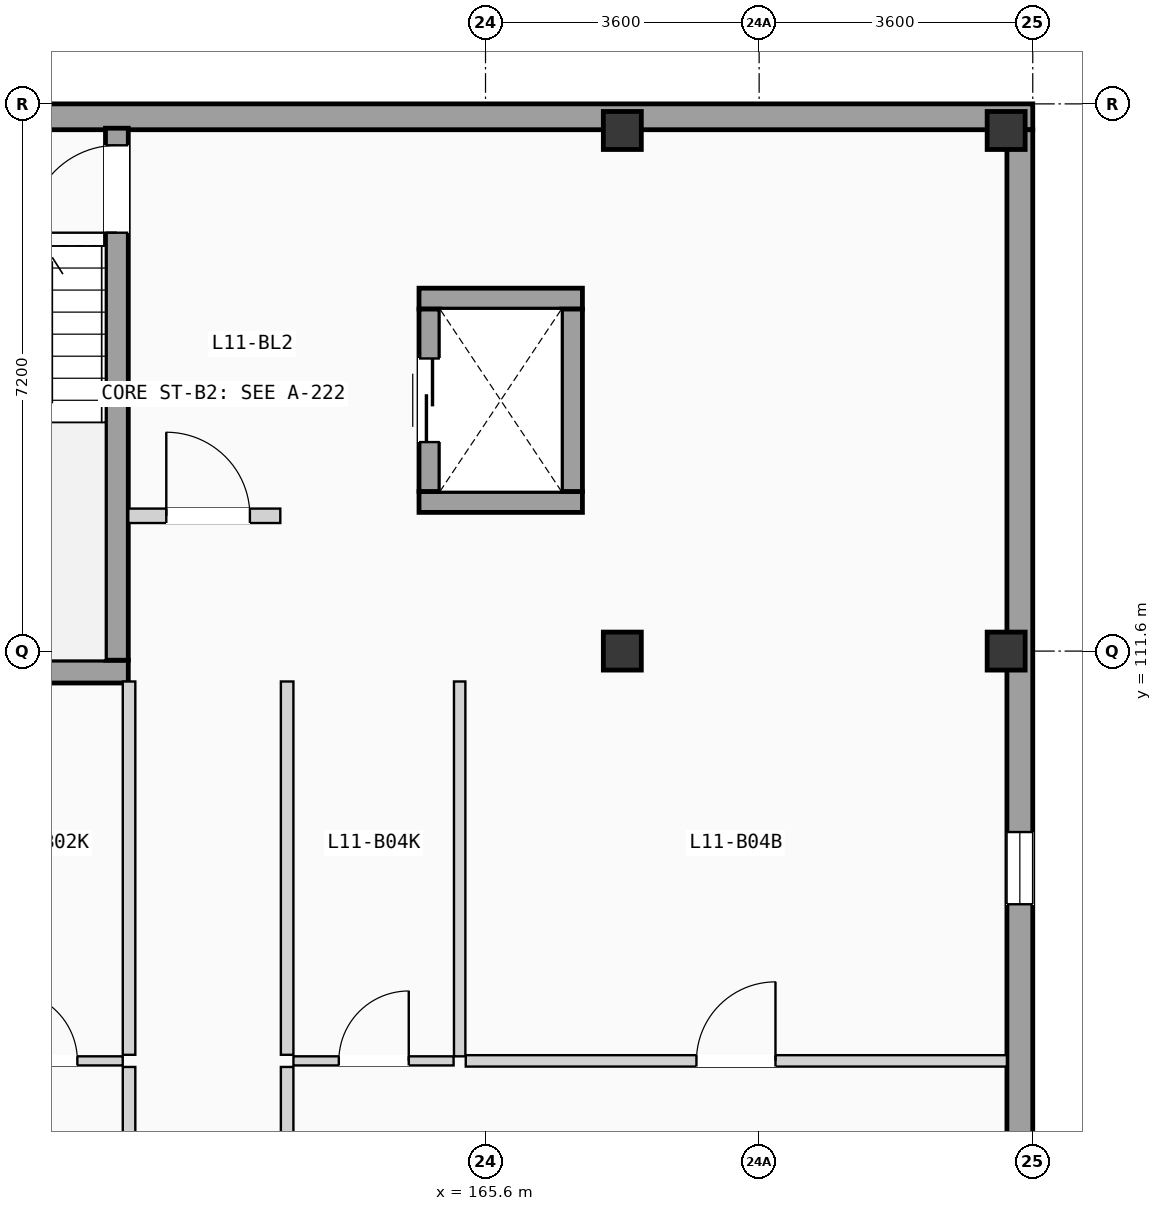
"""IFC4 building model, lengths in metres.
Left out: names, types, materials, properties, quantities, classifications, styles, units other than length and angle.
Written with IfcOpenShell. Run it as: python <this file> out.ifc"""

import sys

from ifc_helpers import new_model, si_unit, direction, frame, frame_2d, origin, origin_2d, place, context, subcontext, project, spatial, rectangle, extrude, element, fill, save


model = new_model("IFC4")
c1 = context("Model", 3, precision=1e-05, world=origin(), true_north=direction((0.0, 1.0)))
c2 = subcontext(c1, "Body", "Model", "MODEL_VIEW")
j1 = project(units=[si_unit("LENGTHUNIT", "METRE"), si_unit("PLANEANGLEUNIT", "RADIAN")], contexts=[c1])
p1 = place(None, origin())
s1 = spatial("IfcSite", under=j1, at=p1, CompositionType="ELEMENT")
p2 = place(p1, origin())
s2 = spatial("IfcBuilding", under=s1, at=p2, CompositionType="ELEMENT")
p3 = place(p2, frame((0.0, 0.0, 37.275)))
s3 = spatial("IfcBuildingStorey", under=s2, at=p3, CompositionType="ELEMENT", Elevation=37.275)
for number, where, z_axis, x_axis in (
    (1, (167.4, 111.6, 0.0), (0.0, 0.0, 1.0), (1.0, 0.0, 0.0)),
    (2, (167.4, 118.45, 0.0), (0.0, 0.0, 1.0), (1.0, 0.0, 0.0)),
    (3, (172.45, 111.6, 0.0), (0.0, 0.0, 1.0), (1.0, 0.0, 0.0)),
    (4, (172.45, 118.45, 0.0), (0.0, 0.0, 1.0), (1.0, 0.0, 0.0)),
):
    element("IfcColumn", number, at=place(p3, frame(where, z_axis=z_axis, x_axis=x_axis)), inside=s3, PredefinedType="COLUMN", context=c2, shape_type="SweptSolid", body=[
        extrude(rectangle(XDim=0.5, YDim=0.5, at=origin_2d()), origin(), (0.0, 0.0, 1.0), 3.15),
    ])
p4 = place(p3, frame((151.2, 118.63, 0.0), z_axis=(0.0, 0.0, 1.0), x_axis=(1.0, 0.0, 0.0)))
e5 = element("IfcWall", 5, at=p4, inside=s3, PredefinedType="SOLIDWALL", context=c2, shape_type="SweptSolid", body=[
    extrude(rectangle(XDim=21.6, YDim=0.34, at=frame_2d((10.8, 0.0))), origin(), (0.0, 0.0, 1.0), 2.6),
])
p5 = place(p3, frame((172.63, 68.74, 0.0), z_axis=(0.0, 0.0, 1.0), x_axis=(0.0, 1.0, 0.0)))
e6 = element("IfcWall", 6, at=p5, inside=s3, PredefinedType="SOLIDWALL", context=c2, shape_type="SweptSolid", body=[
    extrude(rectangle(XDim=49.72, YDim=0.34, at=frame_2d((24.86, 0.0))), origin(), (0.0, 0.0, 1.0), 2.6),
])
p6 = place(p5, frame((16.132, 0.0, 0.515)))
e7 = element("IfcOpeningElement", 7, at=p6, cuts=e6, PredefinedType="OPENING", context=c2, shape_type="SweptSolid", body=[
    extrude(rectangle(XDim=2.3, YDim=1.65, at=frame_2d((1.15, 0.825))), frame((0.0, 0.18, 0.0), z_axis=(0.0, -1.0, 0.0), x_axis=(1.0, 0.0, 0.0)), (0.0, 0.0, 1.0), 0.36),
])
p7 = place(p5, frame((9.678, 0.0, 0.85)))
e8 = element("IfcOpeningElement", 8, at=p7, cuts=e6, PredefinedType="OPENING", context=c2, shape_type="SweptSolid", body=[
    extrude(rectangle(XDim=0.95, YDim=1.2, at=frame_2d((0.475, 0.6))), frame((0.0, 0.18, 0.0), z_axis=(0.0, -1.0, 0.0), x_axis=(1.0, 0.0, 0.0)), (0.0, 0.0, 1.0), 0.36),
])
p8 = place(p5, frame((23.379, 0.0, 0.9)))
e9 = element("IfcOpeningElement", 9, at=p8, cuts=e6, PredefinedType="OPENING", context=c2, shape_type="SweptSolid", body=[
    extrude(rectangle(XDim=0.95, YDim=1.2, at=frame_2d((0.475, 0.6))), frame((0.0, 0.18, 0.0), z_axis=(0.0, -1.0, 0.0), x_axis=(1.0, 0.0, 0.0)), (0.0, 0.0, 1.0), 0.36),
])
p9 = place(p5, frame((32.935, 0.0, 0.815)))
e10 = element("IfcOpeningElement", 10, at=p9, cuts=e6, PredefinedType="OPENING", context=c2, shape_type="SweptSolid", body=[
    extrude(rectangle(XDim=0.95, YDim=1.35, at=frame_2d((0.475, 0.675))), frame((0.0, 0.18, 0.0), z_axis=(0.0, -1.0, 0.0), x_axis=(1.0, 0.0, 0.0)), (0.0, 0.0, 1.0), 0.36),
])
p10 = place(p5, frame((29.525, 0.0, 0.665)))
e11 = element("IfcOpeningElement", 11, at=p10, cuts=e6, PredefinedType="OPENING", context=c2, shape_type="SweptSolid", body=[
    extrude(rectangle(XDim=0.95, YDim=1.5, at=frame_2d((0.475, 0.75))), frame((0.0, 0.18, 0.0), z_axis=(0.0, -1.0, 0.0), x_axis=(1.0, 0.0, 0.0)), (0.0, 0.0, 1.0), 0.36),
])
p11 = place(p5, frame((39.529, 0.0, 0.515)))
e12 = element("IfcOpeningElement", 12, at=p11, cuts=e6, PredefinedType="OPENING", context=c2, shape_type="SweptSolid", body=[
    extrude(rectangle(XDim=0.95, YDim=1.65, at=frame_2d((0.475, 0.825))), frame((0.0, 0.18, 0.0), z_axis=(0.0, -1.0, 0.0), x_axis=(1.0, 0.0, 0.0)), (0.0, 0.0, 1.0), 0.36),
])
p12 = place(p3, frame((156.85, 111.33, 0.0), z_axis=(0.0, 0.0, 1.0), x_axis=(1.0, 0.0, 0.0)))
e13 = element("IfcWall", 13, at=p12, inside=s3, PredefinedType="SHEAR", context=c2, shape_type="SweptSolid", body=[
    extrude(rectangle(XDim=4.05, YDim=0.3, at=frame_2d((2.025, 0.0))), origin(), (0.0, 0.0, 1.0), 2.9),
])
p13 = place(p3, frame((160.75, 111.48, 0.0), z_axis=(0.0, 0.0, 1.0), x_axis=(0.0, 1.0, 0.0)))
e14 = element("IfcWall", 14, at=p13, inside=s3, PredefinedType="SHEAR", context=c2, shape_type="SweptSolid", body=[
    extrude(rectangle(XDim=7.0, YDim=0.3, at=frame_2d((3.5, 0.0))), origin(), (0.0, 0.0, 1.0), 2.9),
])
p14 = place(p13, frame((5.625, 0.0, 0.0)))
e15 = element("IfcOpeningElement", 15, at=p14, cuts=e14, PredefinedType="OPENING", context=c2, shape_type="SweptSolid", body=[
    extrude(rectangle(XDim=1.15, YDim=2.12, at=frame_2d((0.575, 1.06))), frame((0.0, 0.16, 0.0), z_axis=(0.0, -1.0, 0.0), x_axis=(1.0, 0.0, 0.0)), (0.0, 0.0, 1.0), 0.32),
])
for number, where, z_axis, x_axis in (
    (16, (164.725, 113.562, 0.0), (0.0, 0.0, 1.0), (1.0, 0.0, 0.0)),
    (17, (164.725, 116.238, 0.0), (0.0, 0.0, 1.0), (1.0, 0.0, 0.0)),
):
    element("IfcWall", number, at=place(p3, frame(where, z_axis=z_axis, x_axis=x_axis)), inside=s3, PredefinedType="SHEAR", context=c2, shape_type="SweptSolid", body=[
        extrude(rectangle(XDim=2.15, YDim=0.275, at=frame_2d((1.075, 0.0))), origin(), (0.0, 0.0, 1.0), 2.9),
    ])
p15 = place(p3, frame((164.863, 113.7, 0.0), z_axis=(0.0, 0.0, 1.0), x_axis=(0.0, 1.0, 0.0)))
e18 = element("IfcWall", 18, at=p15, inside=s3, PredefinedType="SHEAR", context=c2, shape_type="SweptSolid", body=[
    extrude(rectangle(XDim=2.4, YDim=0.275, at=frame_2d((1.2, 0.0))), origin(), (0.0, 0.0, 1.0), 2.9),
])
p16 = place(p15, frame((0.65, 0.0, 0.0)))
e19 = element("IfcOpeningElement", 19, at=p16, cuts=e18, PredefinedType="OPENING", context=c2, shape_type="SweptSolid", body=[
    extrude(rectangle(XDim=1.1, YDim=2.15, at=frame_2d((0.55, 1.075))), frame((0.0, 0.147, 0.0), z_axis=(0.0, -1.0, 0.0), x_axis=(1.0, 0.0, 0.0)), (0.0, 0.0, 1.0), 0.295),
])
p17 = place(p3, frame((166.738, 113.7, 0.0), z_axis=(0.0, 0.0, 1.0), x_axis=(0.0, 1.0, 0.0)))
e20 = element("IfcWall", 20, at=p17, inside=s3, PredefinedType="SHEAR", context=c2, shape_type="SweptSolid", body=[
    extrude(rectangle(XDim=2.4, YDim=0.275, at=frame_2d((1.2, 0.0))), origin(), (0.0, 0.0, 1.0), 2.9),
])
p18 = place(p3, frame((160.9, 113.38, 0.0), z_axis=(0.0, 0.0, 1.0), x_axis=(1.0, 0.0, 0.0)))
e21 = element("IfcWall", 21, at=p18, inside=s3, PredefinedType="PARTITIONING", context=c2, shape_type="SweptSolid", body=[
    extrude(rectangle(XDim=2.0, YDim=0.19, at=frame_2d((1.0, 0.0))), origin(), (0.0, 0.0, 1.0), 2.87),
])
p19 = place(p18, frame((0.5, 0.0, 0.0)))
e22 = element("IfcOpeningElement", 22, at=p19, cuts=e21, PredefinedType="OPENING", context=c2, shape_type="SweptSolid", body=[
    extrude(rectangle(XDim=1.1, YDim=2.12, at=frame_2d((0.55, 1.06))), frame((0.0, 0.105, 0.0), z_axis=(0.0, -1.0, 0.0), x_axis=(1.0, 0.0, 0.0)), (0.0, 0.0, 1.0), 0.21),
])
p20 = place(p3, frame((160.91, 100.17, 0.0), z_axis=(0.0, 0.0, 1.0), x_axis=(0.0, 1.0, 0.0)))
e23 = element("IfcWall", 23, at=p20, inside=s3, PredefinedType="PARTITIONING", context=c2, shape_type="SweptSolid", body=[
    extrude(rectangle(XDim=5.958, YDim=0.165, at=frame_2d((2.979, 0.0))), origin(), (0.0, 0.0, 1.0), 2.87),
])
p21 = place(p20, frame((2.489, 0.0, 0.0)))
e24 = element("IfcOpeningElement", 24, at=p21, cuts=e23, PredefinedType="OPENING", context=c2, shape_type="SweptSolid", body=[
    extrude(rectangle(XDim=0.98, YDim=2.08, at=frame_2d((0.49, 1.04))), frame((0.0, 0.093, 0.0), z_axis=(0.0, -1.0, 0.0), x_axis=(1.0, 0.0, 0.0)), (0.0, 0.0, 1.0), 0.185),
])
p22 = place(p3, frame((160.91, 106.288, 0.0), z_axis=(0.0, 0.0, 1.0), x_axis=(0.0, 1.0, 0.0)))
e25 = element("IfcWall", 25, at=p22, inside=s3, PredefinedType="PARTITIONING", context=c2, shape_type="SweptSolid", body=[
    extrude(rectangle(XDim=4.912, YDim=0.165, at=frame_2d((2.456, 0.0))), origin(), (0.0, 0.0, 1.0), 2.87),
])
p23 = place(p3, frame((162.99, 100.17, 0.0), z_axis=(0.0, 0.0, 1.0), x_axis=(0.0, 1.0, 0.0)))
e26 = element("IfcWall", 26, at=p23, inside=s3, PredefinedType="PARTITIONING", context=c2, shape_type="SweptSolid", body=[
    extrude(rectangle(XDim=5.958, YDim=0.165, at=frame_2d((2.979, 0.0))), origin(), (0.0, 0.0, 1.0), 2.87),
])
p24 = place(p23, frame((2.489, 0.0, 0.0)))
e27 = element("IfcOpeningElement", 27, at=p24, cuts=e26, PredefinedType="OPENING", context=c2, shape_type="SweptSolid", body=[
    extrude(rectangle(XDim=0.98, YDim=2.08, at=frame_2d((0.49, 1.04))), frame((0.0, 0.093, 0.0), z_axis=(0.0, -1.0, 0.0), x_axis=(1.0, 0.0, 0.0)), (0.0, 0.0, 1.0), 0.185),
])
p25 = place(p3, frame((162.99, 106.288, 0.0), z_axis=(0.0, 0.0, 1.0), x_axis=(0.0, 1.0, 0.0)))
e28 = element("IfcWall", 28, at=p25, inside=s3, PredefinedType="PARTITIONING", context=c2, shape_type="SweptSolid", body=[
    extrude(rectangle(XDim=4.912, YDim=0.165, at=frame_2d((2.456, 0.0))), origin(), (0.0, 0.0, 1.0), 2.87),
])
p26 = place(p3, frame((158.72, 106.208, 0.0), z_axis=(0.0, 0.0, 1.0), x_axis=(1.0, 0.0, 0.0)))
e29 = element("IfcWall", 29, at=p26, inside=s3, PredefinedType="PARTITIONING", context=c2, shape_type="SweptSolid", body=[
    extrude(rectangle(XDim=2.107, YDim=0.12, at=frame_2d((1.053, 0.0))), origin(), (0.0, 0.0, 1.0), 2.87),
])
p27 = place(p26, frame((0.59, 0.0, 0.0)))
e30 = element("IfcOpeningElement", 30, at=p27, cuts=e29, PredefinedType="OPENING", context=c2, shape_type="SweptSolid", body=[
    extrude(rectangle(XDim=0.92, YDim=2.02, at=frame_2d((0.46, 1.01))), frame((0.0, 0.07, 0.0), z_axis=(0.0, -1.0, 0.0), x_axis=(1.0, 0.0, 0.0)), (0.0, 0.0, 1.0), 0.14),
])
p28 = place(p3, frame((163.073, 106.208, 0.0), z_axis=(0.0, 0.0, 1.0), x_axis=(1.0, 0.0, 0.0)))
e31 = element("IfcWall", 31, at=p28, inside=s3, PredefinedType="PARTITIONING", context=c2, shape_type="SweptSolid", body=[
    extrude(rectangle(XDim=2.107, YDim=0.12, at=frame_2d((1.053, 0.0))), origin(), (0.0, 0.0, 1.0), 2.87),
])
p29 = place(p28, frame((0.597, 0.0, 0.0)))
e32 = element("IfcOpeningElement", 32, at=p29, cuts=e31, PredefinedType="OPENING", context=c2, shape_type="SweptSolid", body=[
    extrude(rectangle(XDim=0.92, YDim=2.02, at=frame_2d((0.46, 1.01))), frame((0.0, 0.07, 0.0), z_axis=(0.0, -1.0, 0.0), x_axis=(1.0, 0.0, 0.0)), (0.0, 0.0, 1.0), 0.14),
])
p30 = place(p3, frame((165.34, 106.208, 0.0), z_axis=(0.0, 0.0, 1.0), x_axis=(1.0, 0.0, 0.0)))
e33 = element("IfcWall", 33, at=p30, inside=s3, PredefinedType="PARTITIONING", context=c2, shape_type="SweptSolid", body=[
    extrude(rectangle(XDim=7.12, YDim=0.15, at=frame_2d((3.56, 0.0))), origin(), (0.0, 0.0, 1.0), 2.87),
])
p31 = place(p30, frame((3.035, 0.0, 0.0)))
e34 = element("IfcOpeningElement", 34, at=p31, cuts=e33, PredefinedType="OPENING", context=c2, shape_type="SweptSolid", body=[
    extrude(rectangle(XDim=1.04, YDim=2.08, at=frame_2d((0.52, 1.04))), frame((0.0, 0.085, 0.0), z_axis=(0.0, -1.0, 0.0), x_axis=(1.0, 0.0, 0.0)), (0.0, 0.0, 1.0), 0.17),
])
p32 = place(p3, frame((165.26, 106.268, 0.0), z_axis=(0.0, 0.0, 1.0), x_axis=(0.0, 1.0, 0.0)))
e35 = element("IfcWall", 35, at=p32, inside=s3, PredefinedType="PARTITIONING", context=c2, shape_type="SweptSolid", body=[
    extrude(rectangle(XDim=4.932, YDim=0.15, at=frame_2d((2.466, 0.0))), origin(), (0.0, 0.0, 1.0), 2.87),
])
p33 = place(p11, origin())
e36 = element("IfcWindow", 36, at=p33, inside=s3, PartitioningType="SINGLE_PANEL", PredefinedType="WINDOW", context=c2, shape_type="SweptSolid", body=[
    extrude(rectangle(XDim=0.95, YDim=1.65, at=frame_2d((0.475, 0.825))), frame((0.0, 0.03, 0.0), z_axis=(0.0, -1.0, 0.0), x_axis=(1.0, 0.0, 0.0)), (0.0, 0.0, 1.0), 0.06),
])
fill(e12, e36)
p34 = place(p14, origin())
e37 = element("IfcDoor", 37, at=p34, inside=s3, OperationType="SINGLE_SWING_LEFT", PredefinedType="DOOR", context=c2, shape_type="SweptSolid", body=[
    extrude(rectangle(XDim=1.15, YDim=2.12, at=frame_2d((0.575, 1.06))), frame((0.0, 0.025, 0.0), z_axis=(0.0, -1.0, 0.0), x_axis=(1.0, 0.0, 0.0)), (0.0, 0.0, 1.0), 0.05),
])
fill(e15, e37)
p35 = place(p16, origin())
e38 = element("IfcDoor", 38, at=p35, inside=s3, OperationType="SLIDING_TO_LEFT", PredefinedType="DOOR", context=c2, shape_type="SweptSolid", body=[
    extrude(rectangle(XDim=1.1, YDim=2.15, at=frame_2d((0.55, 1.075))), frame((0.0, 0.025, 0.0), z_axis=(0.0, -1.0, 0.0), x_axis=(1.0, 0.0, 0.0)), (0.0, 0.0, 1.0), 0.05),
])
fill(e19, e38)
p36 = place(p19, origin())
e39 = element("IfcDoor", 39, at=p36, inside=s3, OperationType="SINGLE_SWING_LEFT", PredefinedType="DOOR", context=c2, shape_type="SweptSolid", body=[
    extrude(rectangle(XDim=1.1, YDim=2.12, at=frame_2d((0.55, 1.06))), frame((0.0, 0.025, 0.0), z_axis=(0.0, -1.0, 0.0), x_axis=(1.0, 0.0, 0.0)), (0.0, 0.0, 1.0), 0.05),
])
fill(e22, e39)
p37 = place(p27, origin())
e40 = element("IfcDoor", 40, at=p37, inside=s3, OperationType="SINGLE_SWING_LEFT", PredefinedType="DOOR", context=c2, shape_type="SweptSolid", body=[
    extrude(rectangle(XDim=0.92, YDim=2.02, at=frame_2d((0.46, 1.01))), frame((0.0, 0.025, 0.0), z_axis=(0.0, -1.0, 0.0), x_axis=(1.0, 0.0, 0.0)), (0.0, 0.0, 1.0), 0.05),
])
fill(e30, e40)
p38 = place(p29, origin())
e41 = element("IfcDoor", 41, at=p38, inside=s3, OperationType="SINGLE_SWING_RIGHT", PredefinedType="DOOR", context=c2, shape_type="SweptSolid", body=[
    extrude(rectangle(XDim=0.92, YDim=2.02, at=frame_2d((0.46, 1.01))), frame((0.0, 0.025, 0.0), z_axis=(0.0, -1.0, 0.0), x_axis=(1.0, 0.0, 0.0)), (0.0, 0.0, 1.0), 0.05),
])
fill(e32, e41)
p39 = place(p31, origin())
e42 = element("IfcDoor", 42, at=p39, inside=s3, OperationType="SINGLE_SWING_RIGHT", PredefinedType="DOOR", context=c2, shape_type="SweptSolid", body=[
    extrude(rectangle(XDim=1.04, YDim=2.08, at=frame_2d((0.52, 1.04))), frame((0.0, 0.025, 0.0), z_axis=(0.0, -1.0, 0.0), x_axis=(1.0, 0.0, 0.0)), (0.0, 0.0, 1.0), 0.05),
])
fill(e34, e42)
save(model, sys.argv[1])
